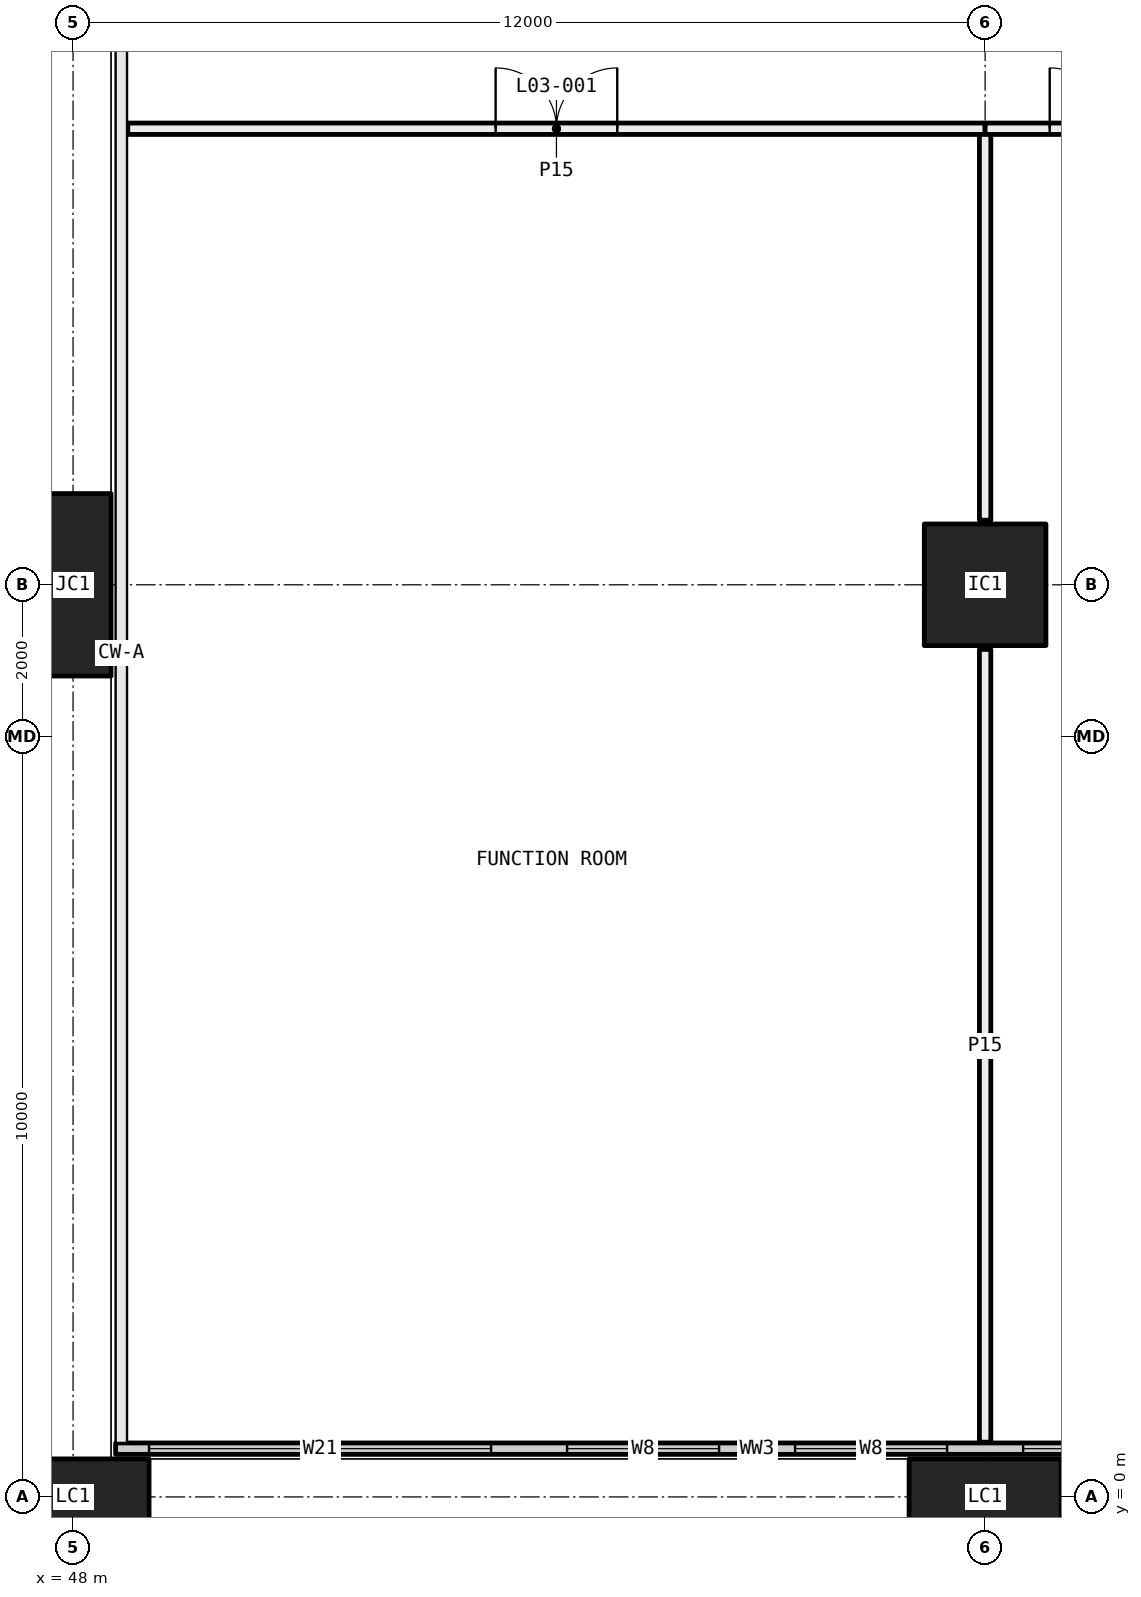
"""IFC4 building model, lengths in metres.
Left out: names, types, materials, properties, quantities, classifications, styles, units other than length and angle.
Written with IfcOpenShell. Run it as: python <this file> out.ifc"""

import sys

from ifc_helpers import new_model, si_unit, direction, frame, frame_2d, origin, origin_2d, place, context, subcontext, project, spatial, rectangle, hollow_rectangle, extrude, element, fill, save


model = new_model("IFC4")
c1 = context("Model", 3, precision=1e-05, world=origin(), true_north=direction((0.0, 1.0)))
c2 = subcontext(c1, "Body", "Model", "MODEL_VIEW")
j1 = project(units=[si_unit("LENGTHUNIT", "METRE"), si_unit("PLANEANGLEUNIT", "RADIAN")], contexts=[c1])
p1 = place(None, origin())
s1 = spatial("IfcSite", under=j1, at=p1, CompositionType="ELEMENT")
p2 = place(p1, origin())
s2 = spatial("IfcBuilding", under=s1, at=p2, CompositionType="ELEMENT")
p3 = place(p2, frame((0.0, 0.0, 18.0)))
s3 = spatial("IfcBuildingStorey", under=s2, at=p3, CompositionType="ELEMENT", Elevation=18.0)
p4 = place(p3, frame((48.0, 0.0, -0.4), z_axis=(0.0, 0.0, 1.0), x_axis=(1.0, 0.0, 0.0)))
e1 = element("IfcColumn", 1, at=p4, inside=s3, PredefinedType="COLUMN", context=c2, shape_type="SweptSolid", body=[
    extrude(hollow_rectangle(XDim=2.0, YDim=1.0, WallThickness=0.08, at=origin_2d()), origin(), (0.0, 0.0, 1.0), 6.0),
])
p5 = place(p3, frame((48.0, 12.0, -0.4), z_axis=(0.0, 0.0, 1.0), x_axis=(0.0, 1.0, 0.0)))
e2 = element("IfcColumn", 2, at=p5, inside=s3, PredefinedType="COLUMN", context=c2, shape_type="SweptSolid", body=[
    extrude(hollow_rectangle(XDim=2.4, YDim=1.0, WallThickness=0.09, at=origin_2d()), origin(), (0.0, 0.0, 1.0), 6.0),
])
p6 = place(p3, frame((60.0, 0.0, -0.4), z_axis=(0.0, 0.0, 1.0), x_axis=(1.0, 0.0, 0.0)))
e3 = element("IfcColumn", 3, at=p6, inside=s3, PredefinedType="COLUMN", context=c2, shape_type="SweptSolid", body=[
    extrude(hollow_rectangle(XDim=2.0, YDim=1.0, WallThickness=0.08, at=origin_2d()), origin(), (0.0, 0.0, 1.0), 6.0),
])
p7 = place(p3, frame((60.0, 12.0, 0.0), z_axis=(0.0, 0.0, 1.0), x_axis=(1.0, 0.0, 0.0)))
e4 = element("IfcColumn", 4, at=p7, inside=s3, PredefinedType="COLUMN", context=c2, shape_type="SweptSolid", body=[
    extrude(hollow_rectangle(XDim=1.6, YDim=1.6, WallThickness=0.07, at=origin_2d()), origin(), (0.0, 0.0, 1.0), 5.6),
])
p8 = place(p3, frame((48.56, 0.635, 0.0), z_axis=(0.0, 0.0, 1.0), x_axis=(1.0, 0.0, 0.0)))
e5 = element("IfcWall", 5, at=p8, inside=s3, PredefinedType="ELEMENTEDWALL", context=c2, shape_type="SweptSolid", body=[
    extrude(rectangle(XDim=16.88, YDim=0.15, at=frame_2d((8.44, 0.0))), origin(), (0.0, 0.0, 1.0), 5.6),
])
p9 = place(p8, frame((0.44, 0.0, 0.45)))
e6 = element("IfcOpeningElement", 6, at=p9, cuts=e5, PredefinedType="OPENING", context=c2, shape_type="SweptSolid", body=[
    extrude(rectangle(XDim=4.5, YDim=5.1, at=frame_2d((2.25, 2.55))), frame((0.0, 0.085, 0.0), z_axis=(0.0, -1.0, 0.0), x_axis=(1.0, 0.0, 0.0)), (0.0, 0.0, 1.0), 0.17),
])
p10 = place(p8, frame((5.94, 0.0, 0.45)))
e7 = element("IfcOpeningElement", 7, at=p10, cuts=e5, PredefinedType="OPENING", context=c2, shape_type="SweptSolid", body=[
    extrude(rectangle(XDim=2.0, YDim=5.1, at=frame_2d((1.0, 2.55))), frame((0.0, 0.085, 0.0), z_axis=(0.0, -1.0, 0.0), x_axis=(1.0, 0.0, 0.0)), (0.0, 0.0, 1.0), 0.17),
])
p11 = place(p8, frame((8.94, 0.0, 0.45)))
e8 = element("IfcOpeningElement", 8, at=p11, cuts=e5, PredefinedType="OPENING", context=c2, shape_type="SweptSolid", body=[
    extrude(rectangle(XDim=2.0, YDim=5.1, at=frame_2d((1.0, 2.55))), frame((0.0, 0.085, 0.0), z_axis=(0.0, -1.0, 0.0), x_axis=(1.0, 0.0, 0.0)), (0.0, 0.0, 1.0), 0.17),
])
p12 = place(p8, frame((11.94, 0.0, 0.45)))
e9 = element("IfcOpeningElement", 9, at=p12, cuts=e5, PredefinedType="OPENING", context=c2, shape_type="SweptSolid", body=[
    extrude(rectangle(XDim=4.5, YDim=5.1, at=frame_2d((2.25, 2.55))), frame((0.0, 0.085, 0.0), z_axis=(0.0, -1.0, 0.0), x_axis=(1.0, 0.0, 0.0)), (0.0, 0.0, 1.0), 0.17),
])
p13 = place(p3, frame((48.72, 18.0, 0.0), z_axis=(0.0, 0.0, 1.0), x_axis=(1.0, 0.0, 0.0)))
e10 = element("IfcWall", 10, at=p13, inside=s3, PredefinedType="PARTITIONING", context=c2, shape_type="SweptSolid", body=[
    extrude(rectangle(XDim=11.28, YDim=0.15, at=frame_2d((5.64, 0.0))), origin(), (0.0, 0.0, 1.0), 5.6),
])
p14 = place(p13, frame((4.84, 0.0, 0.0)))
e11 = element("IfcOpeningElement", 11, at=p14, cuts=e10, PredefinedType="OPENING", context=c2, shape_type="SweptSolid", body=[
    extrude(rectangle(XDim=1.6, YDim=2.1, at=frame_2d((0.8, 1.05))), frame((0.0, 0.085, 0.0), z_axis=(0.0, -1.0, 0.0), x_axis=(1.0, 0.0, 0.0)), (0.0, 0.0, 1.0), 0.17),
])
p15 = place(p3, frame((60.0, 18.0, 0.0), z_axis=(0.0, 0.0, 1.0), x_axis=(1.0, 0.0, 0.0)))
e12 = element("IfcWall", 12, at=p15, inside=s3, PredefinedType="PARTITIONING", context=c2, shape_type="SweptSolid", body=[
    extrude(rectangle(XDim=3.3, YDim=0.15, at=frame_2d((1.65, 0.0))), origin(), (0.0, 0.0, 1.0), 5.6),
])
p16 = place(p15, frame((0.85, 0.0, 0.0)))
e13 = element("IfcOpeningElement", 13, at=p16, cuts=e12, PredefinedType="OPENING", context=c2, shape_type="SweptSolid", body=[
    extrude(rectangle(XDim=1.6, YDim=2.1, at=frame_2d((0.8, 1.05))), frame((0.0, 0.085, 0.0), z_axis=(0.0, -1.0, 0.0), x_axis=(1.0, 0.0, 0.0)), (0.0, 0.0, 1.0), 0.17),
])
p17 = place(p3, frame((60.0, 0.72, 0.0), z_axis=(0.0, 0.0, 1.0), x_axis=(0.0, 1.0, 0.0)))
e14 = element("IfcWall", 14, at=p17, inside=s3, PredefinedType="PARTITIONING", context=c2, shape_type="SweptSolid", body=[
    extrude(rectangle(XDim=10.43, YDim=0.15, at=frame_2d((5.215, 0.0))), origin(), (0.0, 0.0, 1.0), 5.6),
])
p18 = place(p3, frame((60.0, 12.85, 0.0), z_axis=(0.0, 0.0, 1.0), x_axis=(0.0, 1.0, 0.0)))
e15 = element("IfcWall", 15, at=p18, inside=s3, PredefinedType="PARTITIONING", context=c2, shape_type="SweptSolid", body=[
    extrude(rectangle(XDim=5.075, YDim=0.15, at=frame_2d((2.538, 0.0))), origin(), (0.0, 0.0, 1.0), 5.6),
])
p19 = place(p9, origin())
e16 = element("IfcWindow", 16, at=p19, inside=s3, PartitioningType="SINGLE_PANEL", PredefinedType="WINDOW", context=c2, shape_type="SweptSolid", body=[
    extrude(rectangle(XDim=4.5, YDim=5.1, at=frame_2d((2.25, 2.55))), frame((0.0, 0.03, 0.0), z_axis=(0.0, -1.0, 0.0), x_axis=(1.0, 0.0, 0.0)), (0.0, 0.0, 1.0), 0.06),
])
fill(e6, e16)
p20 = place(p10, origin())
e17 = element("IfcWindow", 17, at=p20, inside=s3, PartitioningType="SINGLE_PANEL", PredefinedType="WINDOW", context=c2, shape_type="SweptSolid", body=[
    extrude(rectangle(XDim=2.0, YDim=5.1, at=frame_2d((1.0, 2.55))), frame((0.0, 0.03, 0.0), z_axis=(0.0, -1.0, 0.0), x_axis=(1.0, 0.0, 0.0)), (0.0, 0.0, 1.0), 0.06),
])
fill(e7, e17)
p21 = place(p11, origin())
e18 = element("IfcWindow", 18, at=p21, inside=s3, PartitioningType="SINGLE_PANEL", PredefinedType="WINDOW", context=c2, shape_type="SweptSolid", body=[
    extrude(rectangle(XDim=2.0, YDim=5.1, at=frame_2d((1.0, 2.55))), frame((0.0, 0.03, 0.0), z_axis=(0.0, -1.0, 0.0), x_axis=(1.0, 0.0, 0.0)), (0.0, 0.0, 1.0), 0.06),
])
fill(e8, e18)
p22 = place(p12, origin())
e19 = element("IfcWindow", 19, at=p22, inside=s3, PartitioningType="SINGLE_PANEL", PredefinedType="WINDOW", context=c2, shape_type="SweptSolid", body=[
    extrude(rectangle(XDim=4.5, YDim=5.1, at=frame_2d((2.25, 2.55))), frame((0.0, 0.03, 0.0), z_axis=(0.0, -1.0, 0.0), x_axis=(1.0, 0.0, 0.0)), (0.0, 0.0, 1.0), 0.06),
])
fill(e9, e19)
p23 = place(p14, origin())
e20 = element("IfcDoor", 20, at=p23, inside=s3, OperationType="DOUBLE_DOOR_SINGLE_SWING", PredefinedType="DOOR", context=c2, shape_type="SweptSolid", body=[
    extrude(rectangle(XDim=1.6, YDim=2.1, at=frame_2d((0.8, 1.05))), frame((0.0, 0.025, 0.0), z_axis=(0.0, -1.0, 0.0), x_axis=(1.0, 0.0, 0.0)), (0.0, 0.0, 1.0), 0.05),
])
fill(e11, e20)
p24 = place(p16, origin())
e21 = element("IfcDoor", 21, at=p24, inside=s3, OperationType="DOUBLE_DOOR_SINGLE_SWING", PredefinedType="DOOR", context=c2, shape_type="SweptSolid", body=[
    extrude(rectangle(XDim=1.6, YDim=2.1, at=frame_2d((0.8, 1.05))), frame((0.0, 0.025, 0.0), z_axis=(0.0, -1.0, 0.0), x_axis=(1.0, 0.0, 0.0)), (0.0, 0.0, 1.0), 0.05),
])
fill(e13, e21)
save(model, sys.argv[1])
